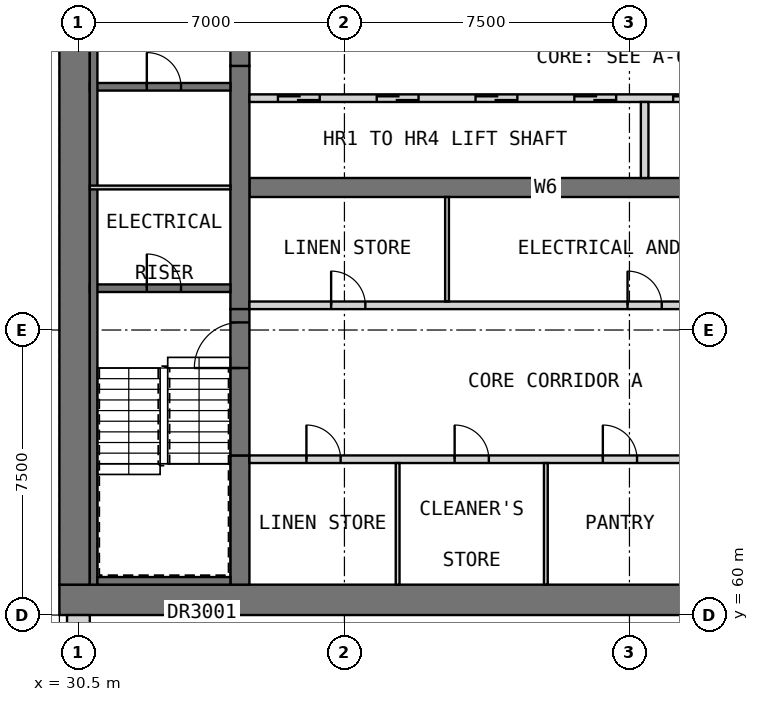
"""IFC4 building model, lengths in metres.
Left out: names, types, materials, properties, quantities, classifications, styles, units other than length and angle.
Written with IfcOpenShell. Run it as: python <this file> out.ifc"""

import sys

from ifc_helpers import new_model, si_unit, direction, frame, frame_2d, origin, place, context, subcontext, project, spatial, rectangle, extrude, element, fill, save


model = new_model("IFC4")
c1 = context("Model", 3, precision=1e-05, world=origin(), true_north=direction((0.0, 1.0)))
c2 = subcontext(c1, "Body", "Model", "MODEL_VIEW")
j1 = project(units=[si_unit("LENGTHUNIT", "METRE"), si_unit("PLANEANGLEUNIT", "RADIAN")], contexts=[c1])
p1 = place(None, origin())
s1 = spatial("IfcSite", under=j1, at=p1, CompositionType="ELEMENT")
p2 = place(p1, origin())
s2 = spatial("IfcBuilding", under=s1, at=p2, CompositionType="ELEMENT")
p3 = place(p2, frame((0.0, 0.0, 186.2)))
s3 = spatial("IfcBuildingStorey", under=s2, at=p3, CompositionType="ELEMENT", Elevation=186.2)
p4 = place(p3, frame((30.0, 60.4, 0.0), z_axis=(0.0, 0.0, 1.0), x_axis=(1.0, 0.0, 0.0)))
e1 = element("IfcWall", 1, at=p4, inside=s3, PredefinedType="SHEAR", context=c2, shape_type="SweptSolid", body=[
    extrude(rectangle(XDim=30.0, YDim=0.8, at=frame_2d((15.0, 0.0))), origin(), (0.0, 0.0, 1.0), 3.5),
])
p5 = place(p4, frame((21.9, 0.0, 0.0)))
e2 = element("IfcOpeningElement", 2, at=p5, cuts=e1, PredefinedType="OPENING", context=c2, shape_type="SweptSolid", body=[
    extrude(rectangle(XDim=1.8, YDim=2.1, at=frame_2d((0.9, 1.05))), frame((0.0, 0.41, 0.0), z_axis=(0.0, -1.0, 0.0), x_axis=(1.0, 0.0, 0.0)), (0.0, 0.0, 1.0), 0.82),
])
p6 = place(p4, frame((26.5, 0.0, 0.0)))
e3 = element("IfcOpeningElement", 3, at=p6, cuts=e1, PredefinedType="OPENING", context=c2, shape_type="SweptSolid", body=[
    extrude(rectangle(XDim=1.2, YDim=2.1, at=frame_2d((0.6, 1.05))), frame((0.0, 0.41, 0.0), z_axis=(0.0, -1.0, 0.0), x_axis=(1.0, 0.0, 0.0)), (0.0, 0.0, 1.0), 0.82),
])
p7 = place(p3, frame((30.4, 60.8, 0.0), z_axis=(0.0, 0.0, 1.0), x_axis=(0.0, 1.0, 0.0)))
e4 = element("IfcWall", 4, at=p7, inside=s3, PredefinedType="SHEAR", context=c2, shape_type="SweptSolid", body=[
    extrude(rectangle(XDim=20.9, YDim=0.8, at=frame_2d((10.45, 0.0))), origin(), (0.0, 0.0, 1.0), 3.5),
])
p8 = place(p3, frame((35.0, 71.25, 0.0), z_axis=(0.0, 0.0, 1.0), x_axis=(1.0, 0.0, 0.0)))
e5 = element("IfcWall", 5, at=p8, inside=s3, PredefinedType="SHEAR", context=c2, shape_type="SweptSolid", body=[
    extrude(rectangle(XDim=15.6, YDim=0.5, at=frame_2d((7.8, 0.0))), origin(), (0.0, 0.0, 1.0), 3.5),
])
p9 = place(p3, frame((34.75, 60.8, 0.0), z_axis=(0.0, 0.0, 1.0), x_axis=(0.0, 1.0, 0.0)))
e6 = element("IfcWall", 6, at=p9, inside=s3, PredefinedType="SHEAR", context=c2, shape_type="SweptSolid", body=[
    extrude(rectangle(XDim=3.4, YDim=0.5, at=frame_2d((1.7, 0.0))), origin(), (0.0, 0.0, 1.0), 3.5),
])
p10 = place(p3, frame((34.75, 68.05, 0.0), z_axis=(0.0, 0.0, 1.0), x_axis=(0.0, 1.0, 0.0)))
e7 = element("IfcWall", 7, at=p10, inside=s3, PredefinedType="SHEAR", context=c2, shape_type="SweptSolid", body=[
    extrude(rectangle(XDim=6.4, YDim=0.5, at=frame_2d((3.2, 0.0))), origin(), (0.0, 0.0, 1.0), 3.5),
])
p11 = place(p2, frame((0.0, 0.0, 34.0)))
s4 = spatial("IfcBuildingStorey", under=s2, at=p11, CompositionType="ELEMENT", Elevation=34.0)
for number, where, z_axis, x_axis in (
    (8, (29.7, 61.05, 0.0), (0.0, 0.0, 1.0), (0.0, 1.0, 0.0)),
    (9, (29.7, 65.925, 0.0), (0.0, 0.0, 1.0), (0.0, 1.0, 0.0)),
    (10, (29.7, 70.8, 0.0), (0.0, 0.0, 1.0), (0.0, 1.0, 0.0)),
):
    element("IfcWall", number, at=place(p11, frame(where, z_axis=z_axis, x_axis=x_axis)), inside=s4, PredefinedType="SOLIDWALL", context=c2, shape_type="SweptSolid", body=[
        extrude(rectangle(XDim=0.9, YDim=0.6, at=frame_2d((0.45, 0.0))), origin(), (0.0, 0.0, 1.0), 286.2),
    ])
p12 = place(p3, frame((30.5, 60.0, 0.0), z_axis=(0.0, 0.0, 1.0), x_axis=(0.0, -1.0, 0.0)))
e11 = element("IfcWall", 11, at=p12, inside=s3, PredefinedType="SOLIDWALL", context=c2, shape_type="SweptSolid", body=[
    extrude(rectangle(XDim=7.0, YDim=0.6, at=frame_2d((3.5, 0.0))), origin(), (0.0, 0.0, 1.0), 3.25),
])
p13 = place(p12, frame((4.175, 0.0, 0.8)))
e12 = element("IfcOpeningElement", 12, at=p13, cuts=e11, PredefinedType="OPENING", context=c2, shape_type="SweptSolid", body=[
    extrude(rectangle(XDim=2.4, YDim=1.8, at=frame_2d((1.2, 0.9))), frame((0.0, 0.31, 0.0), z_axis=(0.0, -1.0, 0.0), x_axis=(1.0, 0.0, 0.0)), (0.0, 0.0, 1.0), 0.62),
])
p14 = place(p12, frame((0.675, 0.0, 0.8)))
e13 = element("IfcOpeningElement", 13, at=p14, cuts=e11, PredefinedType="OPENING", context=c2, shape_type="SweptSolid", body=[
    extrude(rectangle(XDim=2.4, YDim=1.8, at=frame_2d((1.2, 0.9))), frame((0.0, 0.31, 0.0), z_axis=(0.0, -1.0, 0.0), x_axis=(1.0, 0.0, 0.0)), (0.0, 0.0, 1.0), 0.62),
])
p15 = place(p3, frame((35.0, 64.1, 0.0), z_axis=(0.0, 0.0, 1.0), x_axis=(1.0, 0.0, 0.0)))
e14 = element("IfcWall", 14, at=p15, inside=s3, PredefinedType="PARTITIONING", context=c2, shape_type="SweptSolid", body=[
    extrude(rectangle(XDim=15.6, YDim=0.2, at=frame_2d((7.8, 0.0))), origin(), (0.0, 0.0, 1.0), 3.25),
])
p16 = place(p15, frame((1.5, 0.0, 0.0)))
e15 = element("IfcOpeningElement", 15, at=p16, cuts=e14, PredefinedType="OPENING", context=c2, shape_type="SweptSolid", body=[
    extrude(rectangle(XDim=0.9, YDim=2.1, at=frame_2d((0.45, 1.05))), frame((0.0, 0.11, 0.0), z_axis=(0.0, -1.0, 0.0), x_axis=(1.0, 0.0, 0.0)), (0.0, 0.0, 1.0), 0.22),
])
p17 = place(p15, frame((5.4, 0.0, 0.0)))
e16 = element("IfcOpeningElement", 16, at=p17, cuts=e14, PredefinedType="OPENING", context=c2, shape_type="SweptSolid", body=[
    extrude(rectangle(XDim=0.9, YDim=2.1, at=frame_2d((0.45, 1.05))), frame((0.0, 0.11, 0.0), z_axis=(0.0, -1.0, 0.0), x_axis=(1.0, 0.0, 0.0)), (0.0, 0.0, 1.0), 0.22),
])
p18 = place(p15, frame((9.3, 0.0, 0.0)))
e17 = element("IfcOpeningElement", 17, at=p18, cuts=e14, PredefinedType="OPENING", context=c2, shape_type="SweptSolid", body=[
    extrude(rectangle(XDim=0.9, YDim=2.1, at=frame_2d((0.45, 1.05))), frame((0.0, 0.11, 0.0), z_axis=(0.0, -1.0, 0.0), x_axis=(1.0, 0.0, 0.0)), (0.0, 0.0, 1.0), 0.22),
])
p19 = place(p15, frame((13.2, 0.0, 0.0)))
e18 = element("IfcOpeningElement", 18, at=p19, cuts=e14, PredefinedType="OPENING", context=c2, shape_type="SweptSolid", body=[
    extrude(rectangle(XDim=0.9, YDim=2.1, at=frame_2d((0.45, 1.05))), frame((0.0, 0.11, 0.0), z_axis=(0.0, -1.0, 0.0), x_axis=(1.0, 0.0, 0.0)), (0.0, 0.0, 1.0), 0.22),
])
for number, where, z_axis, x_axis in (
    (19, (38.9, 60.8, 0.0), (0.0, 0.0, 1.0), (0.0, 1.0, 0.0)),
    (20, (42.8, 60.8, 0.0), (0.0, 0.0, 1.0), (0.0, 1.0, 0.0)),
):
    element("IfcWall", number, at=place(p3, frame(where, z_axis=z_axis, x_axis=x_axis)), inside=s3, PredefinedType="PARTITIONING", context=c2, shape_type="SweptSolid", body=[
        extrude(rectangle(XDim=3.2, YDim=0.1, at=frame_2d((1.6, 0.0))), origin(), (0.0, 0.0, 1.0), 3.25),
    ])
p20 = place(p3, frame((35.0, 68.15, 0.0), z_axis=(0.0, 0.0, 1.0), x_axis=(1.0, 0.0, 0.0)))
e21 = element("IfcWall", 21, at=p20, inside=s3, PredefinedType="PARTITIONING", context=c2, shape_type="SweptSolid", body=[
    extrude(rectangle(XDim=15.6, YDim=0.2, at=frame_2d((7.8, 0.0))), origin(), (0.0, 0.0, 1.0), 3.25),
])
p21 = place(p20, frame((2.15, 0.0, 0.0)))
e22 = element("IfcOpeningElement", 22, at=p21, cuts=e21, PredefinedType="OPENING", context=c2, shape_type="SweptSolid", body=[
    extrude(rectangle(XDim=0.9, YDim=2.1, at=frame_2d((0.45, 1.05))), frame((0.0, 0.11, 0.0), z_axis=(0.0, -1.0, 0.0), x_axis=(1.0, 0.0, 0.0)), (0.0, 0.0, 1.0), 0.22),
])
p22 = place(p20, frame((9.95, 0.0, 0.0)))
e23 = element("IfcOpeningElement", 23, at=p22, cuts=e21, PredefinedType="OPENING", context=c2, shape_type="SweptSolid", body=[
    extrude(rectangle(XDim=0.9, YDim=2.1, at=frame_2d((0.45, 1.05))), frame((0.0, 0.11, 0.0), z_axis=(0.0, -1.0, 0.0), x_axis=(1.0, 0.0, 0.0)), (0.0, 0.0, 1.0), 0.22),
])
p23 = place(p3, frame((40.2, 68.25, 0.0), z_axis=(0.0, 0.0, 1.0), x_axis=(0.0, 1.0, 0.0)))
e24 = element("IfcWall", 24, at=p23, inside=s3, PredefinedType="PARTITIONING", context=c2, shape_type="SweptSolid", body=[
    extrude(rectangle(XDim=2.75, YDim=0.1, at=frame_2d((1.375, 0.0))), origin(), (0.0, 0.0, 1.0), 3.25),
])
p24 = place(p3, frame((35.0, 73.6, 0.0), z_axis=(0.0, 0.0, 1.0), x_axis=(1.0, 0.0, 0.0)))
e25 = element("IfcWall", 25, at=p24, inside=s3, PredefinedType="SOLIDWALL", context=c2, shape_type="SweptSolid", body=[
    extrude(rectangle(XDim=15.6, YDim=0.2, at=frame_2d((7.8, 0.0))), origin(), (0.0, 0.0, 1.0), 3.5),
])
p25 = place(p24, frame((0.75, 0.0, 0.0)))
e26 = element("IfcOpeningElement", 26, at=p25, cuts=e25, PredefinedType="OPENING", context=c2, shape_type="SweptSolid", body=[
    extrude(rectangle(XDim=1.1, YDim=2.1, at=frame_2d((0.55, 1.05))), frame((0.0, 0.11, 0.0), z_axis=(0.0, -1.0, 0.0), x_axis=(1.0, 0.0, 0.0)), (0.0, 0.0, 1.0), 0.22),
])
p26 = place(p24, frame((3.35, 0.0, 0.0)))
e27 = element("IfcOpeningElement", 27, at=p26, cuts=e25, PredefinedType="OPENING", context=c2, shape_type="SweptSolid", body=[
    extrude(rectangle(XDim=1.1, YDim=2.1, at=frame_2d((0.55, 1.05))), frame((0.0, 0.11, 0.0), z_axis=(0.0, -1.0, 0.0), x_axis=(1.0, 0.0, 0.0)), (0.0, 0.0, 1.0), 0.22),
])
p27 = place(p24, frame((5.95, 0.0, 0.0)))
e28 = element("IfcOpeningElement", 28, at=p27, cuts=e25, PredefinedType="OPENING", context=c2, shape_type="SweptSolid", body=[
    extrude(rectangle(XDim=1.1, YDim=2.1, at=frame_2d((0.55, 1.05))), frame((0.0, 0.11, 0.0), z_axis=(0.0, -1.0, 0.0), x_axis=(1.0, 0.0, 0.0)), (0.0, 0.0, 1.0), 0.22),
])
p28 = place(p24, frame((8.55, 0.0, 0.0)))
e29 = element("IfcOpeningElement", 29, at=p28, cuts=e25, PredefinedType="OPENING", context=c2, shape_type="SweptSolid", body=[
    extrude(rectangle(XDim=1.1, YDim=2.1, at=frame_2d((0.55, 1.05))), frame((0.0, 0.11, 0.0), z_axis=(0.0, -1.0, 0.0), x_axis=(1.0, 0.0, 0.0)), (0.0, 0.0, 1.0), 0.22),
])
p29 = place(p24, frame((11.15, 0.0, 0.0)))
e30 = element("IfcOpeningElement", 30, at=p29, cuts=e25, PredefinedType="OPENING", context=c2, shape_type="SweptSolid", body=[
    extrude(rectangle(XDim=1.1, YDim=2.1, at=frame_2d((0.55, 1.05))), frame((0.0, 0.11, 0.0), z_axis=(0.0, -1.0, 0.0), x_axis=(1.0, 0.0, 0.0)), (0.0, 0.0, 1.0), 0.22),
])
p30 = place(p24, frame((13.75, 0.0, 0.0)))
e31 = element("IfcOpeningElement", 31, at=p30, cuts=e25, PredefinedType="OPENING", context=c2, shape_type="SweptSolid", body=[
    extrude(rectangle(XDim=1.1, YDim=2.1, at=frame_2d((0.55, 1.05))), frame((0.0, 0.11, 0.0), z_axis=(0.0, -1.0, 0.0), x_axis=(1.0, 0.0, 0.0)), (0.0, 0.0, 1.0), 0.22),
])
p31 = place(p3, frame((45.4, 71.5, 0.0), z_axis=(0.0, 0.0, 1.0), x_axis=(0.0, 1.0, 0.0)))
e32 = element("IfcWall", 32, at=p31, inside=s3, PredefinedType="SOLIDWALL", context=c2, shape_type="SweptSolid", body=[
    extrude(rectangle(XDim=2.0, YDim=0.2, at=frame_2d((1.0, 0.0))), origin(), (0.0, 0.0, 1.0), 3.5),
])
p32 = place(p3, frame((34.75, 64.2, 0.0), z_axis=(0.0, 0.0, 1.0), x_axis=(0.0, 1.0, 0.0)))
e33 = element("IfcWall", 33, at=p32, inside=s3, PredefinedType="SOLIDWALL", context=c2, shape_type="SweptSolid", body=[
    extrude(rectangle(XDim=3.85, YDim=0.5, at=frame_2d((1.925, 0.0))), origin(), (0.0, 0.0, 1.0), 2.3),
])
p33 = place(p32, frame((2.3, 0.0, 0.0)))
e34 = element("IfcOpeningElement", 34, at=p33, cuts=e33, PredefinedType="OPENING", context=c2, shape_type="SweptSolid", body=[
    extrude(rectangle(XDim=1.2, YDim=2.1, at=frame_2d((0.6, 1.05))), frame((0.0, 0.26, 0.0), z_axis=(0.0, -1.0, 0.0), x_axis=(1.0, 0.0, 0.0)), (0.0, 0.0, 1.0), 0.52),
])
p34 = place(p3, frame((34.75, 74.45, 0.0), z_axis=(0.0, 0.0, 1.0), x_axis=(0.0, 1.0, 0.0)))
e35 = element("IfcWall", 35, at=p34, inside=s3, PredefinedType="SOLIDWALL", context=c2, shape_type="SweptSolid", body=[
    extrude(rectangle(XDim=3.85, YDim=0.5, at=frame_2d((1.925, 0.0))), origin(), (0.0, 0.0, 1.0), 2.3),
])
p35 = place(p34, frame((1.0, 0.0, 0.0)))
e36 = element("IfcOpeningElement", 36, at=p35, cuts=e35, PredefinedType="OPENING", context=c2, shape_type="SweptSolid", body=[
    extrude(rectangle(XDim=1.2, YDim=2.1, at=frame_2d((0.6, 1.05))), frame((0.0, 0.26, 0.0), z_axis=(0.0, -1.0, 0.0), x_axis=(1.0, 0.0, 0.0)), (0.0, 0.0, 1.0), 0.52),
])
p36 = place(p3, frame((30.8, 68.6, 0.0), z_axis=(0.0, 0.0, 1.0), x_axis=(1.0, 0.0, 0.0)))
e37 = element("IfcWall", 37, at=p36, inside=s3, PredefinedType="SOLIDWALL", context=c2, shape_type="SweptSolid", body=[
    extrude(rectangle(XDim=3.7, YDim=0.2, at=frame_2d((1.85, 0.0))), origin(), (0.0, 0.0, 1.0), 3.25),
])
p37 = place(p36, frame((1.5, 0.0, 0.0)))
e38 = element("IfcOpeningElement", 38, at=p37, cuts=e37, PredefinedType="OPENING", context=c2, shape_type="SweptSolid", body=[
    extrude(rectangle(XDim=0.9, YDim=2.1, at=frame_2d((0.45, 1.05))), frame((0.0, 0.11, 0.0), z_axis=(0.0, -1.0, 0.0), x_axis=(1.0, 0.0, 0.0)), (0.0, 0.0, 1.0), 0.22),
])
p38 = place(p3, frame((30.8, 73.9, 0.0), z_axis=(0.0, 0.0, 1.0), x_axis=(1.0, 0.0, 0.0)))
e39 = element("IfcWall", 39, at=p38, inside=s3, PredefinedType="SOLIDWALL", context=c2, shape_type="SweptSolid", body=[
    extrude(rectangle(XDim=3.7, YDim=0.2, at=frame_2d((1.85, 0.0))), origin(), (0.0, 0.0, 1.0), 3.25),
])
p39 = place(p38, frame((1.5, 0.0, 0.0)))
e40 = element("IfcOpeningElement", 40, at=p39, cuts=e39, PredefinedType="OPENING", context=c2, shape_type="SweptSolid", body=[
    extrude(rectangle(XDim=0.9, YDim=2.1, at=frame_2d((0.45, 1.05))), frame((0.0, 0.11, 0.0), z_axis=(0.0, -1.0, 0.0), x_axis=(1.0, 0.0, 0.0)), (0.0, 0.0, 1.0), 0.22),
])
p40 = place(p3, frame((30.9, 60.8, 0.0), z_axis=(0.0, 0.0, 1.0), x_axis=(0.0, 1.0, 0.0)))
e41 = element("IfcWall", 41, at=p40, inside=s3, PredefinedType="SOLIDWALL", context=c2, shape_type="SweptSolid", body=[
    extrude(rectangle(XDim=20.9, YDim=0.2, at=frame_2d((10.45, 0.0))), origin(), (0.0, 0.0, 1.0), 3.25),
])
p41 = place(p3, frame((31.0, 60.9, 0.0), z_axis=(0.0, 0.0, 1.0), x_axis=(1.0, 0.0, 0.0)))
e42 = element("IfcWall", 42, at=p41, inside=s3, PredefinedType="SOLIDWALL", context=c2, shape_type="SweptSolid", body=[
    extrude(rectangle(XDim=3.5, YDim=0.2, at=frame_2d((1.75, 0.0))), origin(), (0.0, 0.0, 1.0), 3.25),
])
p42 = place(p3, frame((30.8, 71.25, 0.0), z_axis=(0.0, 0.0, 1.0), x_axis=(1.0, 0.0, 0.0)))
e43 = element("IfcWall", 43, at=p42, inside=s3, PredefinedType="PARTITIONING", context=c2, shape_type="SweptSolid", body=[
    extrude(rectangle(XDim=3.7, YDim=0.1, at=frame_2d((1.85, 0.0))), origin(), (0.0, 0.0, 1.0), 3.25),
])
p43 = place(p3, frame((33.75, 57.975, 0.0), z_axis=(0.0, 0.0, 1.0), x_axis=(0.0, 1.0, 0.0)))
e44 = element("IfcWall", 44, at=p43, inside=s3, PredefinedType="PARTITIONING", context=c2, shape_type="SweptSolid", body=[
    extrude(rectangle(XDim=2.025, YDim=0.15, at=frame_2d((1.012, 0.0))), origin(), (0.0, 0.0, 1.0), 3.25),
])
p44 = place(p43, frame((0.525, 0.0, 0.0)))
e45 = element("IfcOpeningElement", 45, at=p44, cuts=e44, PredefinedType="OPENING", context=c2, shape_type="SweptSolid", body=[
    extrude(rectangle(XDim=0.9, YDim=2.1, at=frame_2d((0.45, 1.05))), frame((0.0, 0.085, 0.0), z_axis=(0.0, -1.0, 0.0), x_axis=(1.0, 0.0, 0.0)), (0.0, 0.0, 1.0), 0.17),
])
p45 = place(p16, origin())
e46 = element("IfcDoor", 46, at=p45, inside=s3, OperationType="SINGLE_SWING_LEFT", PredefinedType="DOOR", context=c2, shape_type="SweptSolid", body=[
    extrude(rectangle(XDim=0.9, YDim=2.1, at=frame_2d((0.45, 1.05))), frame((0.0, 0.025, 0.0), z_axis=(0.0, -1.0, 0.0), x_axis=(1.0, 0.0, 0.0)), (0.0, 0.0, 1.0), 0.05),
])
fill(e15, e46)
p46 = place(p17, origin())
e47 = element("IfcDoor", 47, at=p46, inside=s3, OperationType="SINGLE_SWING_RIGHT", PredefinedType="DOOR", context=c2, shape_type="SweptSolid", body=[
    extrude(rectangle(XDim=0.9, YDim=2.1, at=frame_2d((0.45, 1.05))), frame((0.0, 0.025, 0.0), z_axis=(0.0, -1.0, 0.0), x_axis=(1.0, 0.0, 0.0)), (0.0, 0.0, 1.0), 0.05),
])
fill(e16, e47)
p47 = place(p18, origin())
e48 = element("IfcDoor", 48, at=p47, inside=s3, OperationType="SINGLE_SWING_LEFT", PredefinedType="DOOR", context=c2, shape_type="SweptSolid", body=[
    extrude(rectangle(XDim=0.9, YDim=2.1, at=frame_2d((0.45, 1.05))), frame((0.0, 0.025, 0.0), z_axis=(0.0, -1.0, 0.0), x_axis=(1.0, 0.0, 0.0)), (0.0, 0.0, 1.0), 0.05),
])
fill(e17, e48)
p48 = place(p21, origin())
e49 = element("IfcDoor", 49, at=p48, inside=s3, OperationType="SINGLE_SWING_LEFT", PredefinedType="DOOR", context=c2, shape_type="SweptSolid", body=[
    extrude(rectangle(XDim=0.9, YDim=2.1, at=frame_2d((0.45, 1.05))), frame((0.0, 0.025, 0.0), z_axis=(0.0, -1.0, 0.0), x_axis=(1.0, 0.0, 0.0)), (0.0, 0.0, 1.0), 0.05),
])
fill(e22, e49)
p49 = place(p22, origin())
e50 = element("IfcDoor", 50, at=p49, inside=s3, OperationType="SINGLE_SWING_RIGHT", PredefinedType="DOOR", context=c2, shape_type="SweptSolid", body=[
    extrude(rectangle(XDim=0.9, YDim=2.1, at=frame_2d((0.45, 1.05))), frame((0.0, 0.025, 0.0), z_axis=(0.0, -1.0, 0.0), x_axis=(1.0, 0.0, 0.0)), (0.0, 0.0, 1.0), 0.05),
])
fill(e23, e50)
p50 = place(p25, origin())
e51 = element("IfcDoor", 51, at=p50, inside=s3, OperationType="DOUBLE_DOOR_SLIDING", PredefinedType="DOOR", context=c2, shape_type="SweptSolid", body=[
    extrude(rectangle(XDim=1.1, YDim=2.1, at=frame_2d((0.55, 1.05))), frame((0.0, 0.025, 0.0), z_axis=(0.0, -1.0, 0.0), x_axis=(1.0, 0.0, 0.0)), (0.0, 0.0, 1.0), 0.05),
])
fill(e26, e51)
p51 = place(p26, origin())
e52 = element("IfcDoor", 52, at=p51, inside=s3, OperationType="DOUBLE_DOOR_SLIDING", PredefinedType="DOOR", context=c2, shape_type="SweptSolid", body=[
    extrude(rectangle(XDim=1.1, YDim=2.1, at=frame_2d((0.55, 1.05))), frame((0.0, 0.025, 0.0), z_axis=(0.0, -1.0, 0.0), x_axis=(1.0, 0.0, 0.0)), (0.0, 0.0, 1.0), 0.05),
])
fill(e27, e52)
p52 = place(p27, origin())
e53 = element("IfcDoor", 53, at=p52, inside=s3, OperationType="DOUBLE_DOOR_SLIDING", PredefinedType="DOOR", context=c2, shape_type="SweptSolid", body=[
    extrude(rectangle(XDim=1.1, YDim=2.1, at=frame_2d((0.55, 1.05))), frame((0.0, 0.025, 0.0), z_axis=(0.0, -1.0, 0.0), x_axis=(1.0, 0.0, 0.0)), (0.0, 0.0, 1.0), 0.05),
])
fill(e28, e53)
p53 = place(p28, origin())
e54 = element("IfcDoor", 54, at=p53, inside=s3, OperationType="DOUBLE_DOOR_SLIDING", PredefinedType="DOOR", context=c2, shape_type="SweptSolid", body=[
    extrude(rectangle(XDim=1.1, YDim=2.1, at=frame_2d((0.55, 1.05))), frame((0.0, 0.025, 0.0), z_axis=(0.0, -1.0, 0.0), x_axis=(1.0, 0.0, 0.0)), (0.0, 0.0, 1.0), 0.05),
])
fill(e29, e54)
p54 = place(p29, origin())
e55 = element("IfcDoor", 55, at=p54, inside=s3, OperationType="DOUBLE_DOOR_SLIDING", PredefinedType="DOOR", context=c2, shape_type="SweptSolid", body=[
    extrude(rectangle(XDim=1.1, YDim=2.1, at=frame_2d((0.55, 1.05))), frame((0.0, 0.025, 0.0), z_axis=(0.0, -1.0, 0.0), x_axis=(1.0, 0.0, 0.0)), (0.0, 0.0, 1.0), 0.05),
])
fill(e30, e55)
p55 = place(p33, origin())
e56 = element("IfcDoor", 56, at=p55, inside=s3, OperationType="SINGLE_SWING_LEFT", PredefinedType="DOOR", context=c2, shape_type="SweptSolid", body=[
    extrude(rectangle(XDim=1.2, YDim=2.1, at=frame_2d((0.6, 1.05))), frame((0.0, 0.025, 0.0), z_axis=(0.0, -1.0, 0.0), x_axis=(1.0, 0.0, 0.0)), (0.0, 0.0, 1.0), 0.05),
])
fill(e34, e56)
p56 = place(p37, origin())
e57 = element("IfcDoor", 57, at=p56, inside=s3, OperationType="SINGLE_SWING_LEFT", PredefinedType="DOOR", context=c2, shape_type="SweptSolid", body=[
    extrude(rectangle(XDim=0.9, YDim=2.1, at=frame_2d((0.45, 1.05))), frame((0.0, 0.025, 0.0), z_axis=(0.0, -1.0, 0.0), x_axis=(1.0, 0.0, 0.0)), (0.0, 0.0, 1.0), 0.05),
])
fill(e38, e57)
p57 = place(p39, origin())
e58 = element("IfcDoor", 58, at=p57, inside=s3, OperationType="SINGLE_SWING_RIGHT", PredefinedType="DOOR", context=c2, shape_type="SweptSolid", body=[
    extrude(rectangle(XDim=0.9, YDim=2.1, at=frame_2d((0.45, 1.05))), frame((0.0, 0.025, 0.0), z_axis=(0.0, -1.0, 0.0), x_axis=(1.0, 0.0, 0.0)), (0.0, 0.0, 1.0), 0.05),
])
fill(e40, e58)
save(model, sys.argv[1])
